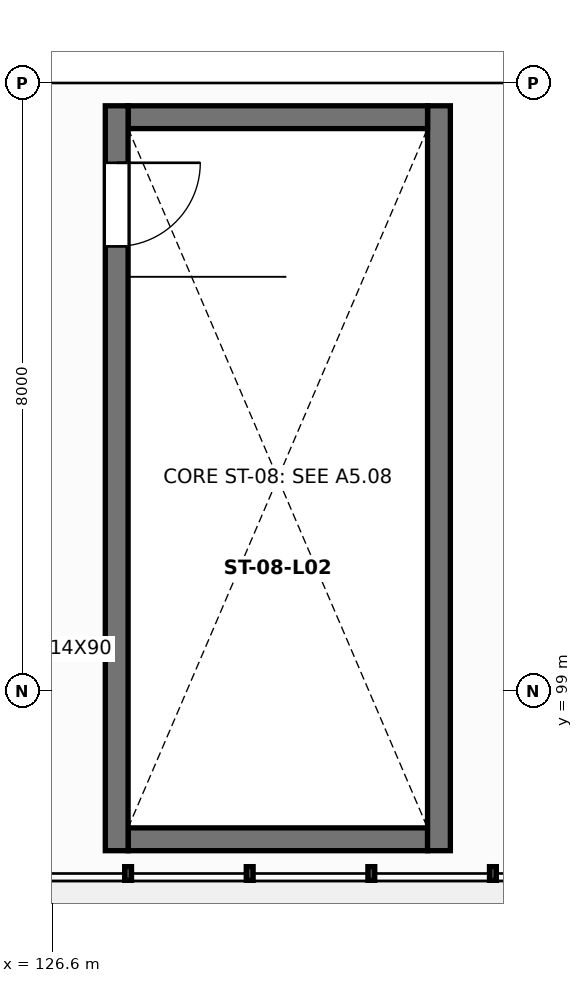
"""IFC4 building model, lengths in metres.
Left out: names, types, materials, properties, quantities, classifications, styles, units other than length and angle.
Written with IfcOpenShell. Run it as: python <this file> out.ifc"""

import sys

from ifc_helpers import new_model, si_unit, direction, frame, frame_2d, origin, place, context, subcontext, project, spatial, rectangle, extrude, element, fill, save


model = new_model("IFC4")
c1 = context("Model", 3, precision=1e-05, world=origin(), true_north=direction((0.0, 1.0)))
c2 = subcontext(c1, "Body", "Model", "MODEL_VIEW")
j1 = project(units=[si_unit("LENGTHUNIT", "METRE"), si_unit("PLANEANGLEUNIT", "RADIAN")], contexts=[c1])
p1 = place(None, origin())
s1 = spatial("IfcSite", under=j1, at=p1, CompositionType="ELEMENT")
p2 = place(p1, origin())
s2 = spatial("IfcBuilding", under=s1, at=p2, CompositionType="ELEMENT")
p3 = place(p2, frame((0.0, 0.0, 11.2)))
s3 = spatial("IfcBuildingStorey", under=s2, at=p3, CompositionType="ELEMENT", Elevation=11.2)
p4 = place(p3, frame((127.6, 97.05, 0.0), z_axis=(0.0, 0.0, 1.0), x_axis=(1.0, 0.0, 0.0)))
e1 = element("IfcWall", 1, at=p4, inside=s3, PredefinedType="SHEAR", context=c2, shape_type="SweptSolid", body=[
    extrude(rectangle(XDim=3.94, YDim=0.3, at=frame_2d((1.97, 0.0))), origin(), (0.0, 0.0, 1.0), 2.55),
])
p5 = place(p3, frame((131.69, 96.9, 0.0), z_axis=(0.0, 0.0, 1.0), x_axis=(0.0, 1.0, 0.0)))
e2 = element("IfcWall", 2, at=p5, inside=s3, PredefinedType="SHEAR", context=c2, shape_type="SweptSolid", body=[
    extrude(rectangle(XDim=9.8, YDim=0.3, at=frame_2d((4.9, 0.0))), origin(), (0.0, 0.0, 1.0), 2.55),
])
p6 = place(p3, frame((131.54, 106.55, 0.0), z_axis=(0.0, 0.0, 1.0), x_axis=(-1.0, 0.0, 0.0)))
e3 = element("IfcWall", 3, at=p6, inside=s3, PredefinedType="SHEAR", context=c2, shape_type="SweptSolid", body=[
    extrude(rectangle(XDim=3.94, YDim=0.3, at=frame_2d((1.97, 0.0))), origin(), (0.0, 0.0, 1.0), 2.55),
])
p7 = place(p3, frame((127.45, 106.7, 0.0), z_axis=(0.0, 0.0, 1.0), x_axis=(0.0, -1.0, 0.0)))
e4 = element("IfcWall", 4, at=p7, inside=s3, PredefinedType="SHEAR", context=c2, shape_type="SweptSolid", body=[
    extrude(rectangle(XDim=9.8, YDim=0.3, at=frame_2d((4.9, 0.0))), origin(), (0.0, 0.0, 1.0), 2.55),
])
p8 = place(p7, frame((0.75, 0.0, 0.0)))
e5 = element("IfcOpeningElement", 5, at=p8, cuts=e4, PredefinedType="OPENING", context=c2, shape_type="SweptSolid", body=[
    extrude(rectangle(XDim=1.1, YDim=2.15, at=frame_2d((0.55, 1.075))), frame((0.0, 0.16, 0.0), z_axis=(0.0, -1.0, 0.0), x_axis=(1.0, 0.0, 0.0)), (0.0, 0.0, 1.0), 0.32),
])
p9 = place(p8, origin())
e6 = element("IfcDoor", 6, at=p9, inside=s3, OperationType="SINGLE_SWING_LEFT", PredefinedType="DOOR", context=c2, shape_type="SweptSolid", body=[
    extrude(rectangle(XDim=1.1, YDim=2.15, at=frame_2d((0.55, 1.075))), frame((0.0, 0.025, 0.0), z_axis=(0.0, -1.0, 0.0), x_axis=(1.0, 0.0, 0.0)), (0.0, 0.0, 1.0), 0.05),
])
fill(e5, e6)
save(model, sys.argv[1])
